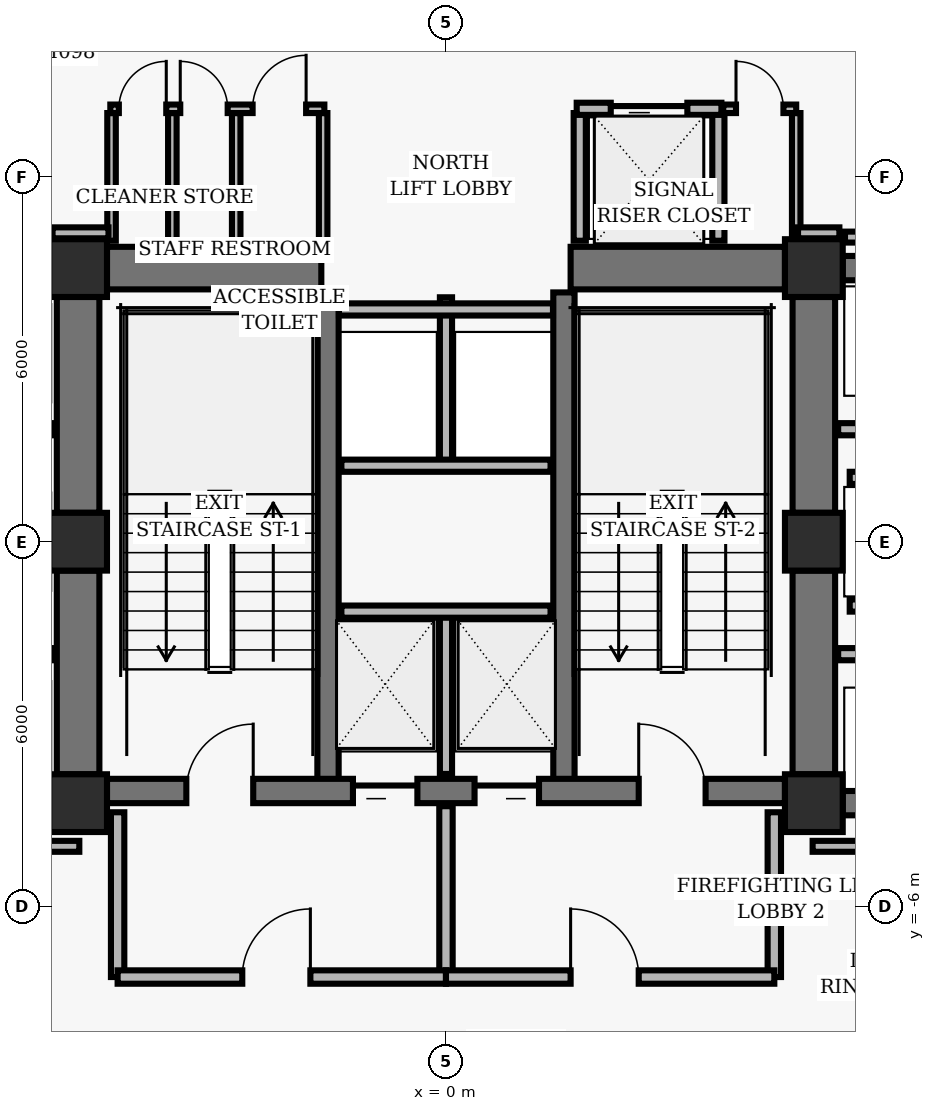
"""IFC4 building model, lengths in metres.
Left out: names, types, materials, properties, quantities, classifications, styles, units other than length and angle.
Written with IfcOpenShell. Run it as: python <this file> out.ifc"""

import sys

from ifc_helpers import new_model, si_unit, direction, frame, frame_2d, origin, origin_2d, place, context, subcontext, project, spatial, rectangle, hollow_rectangle, extrude, element, fill, save


model = new_model("IFC4")
c1 = context("Model", 3, precision=1e-05, world=origin(), true_north=direction((0.0, 1.0)))
c2 = subcontext(c1, "Body", "Model", "MODEL_VIEW")
j1 = project(units=[si_unit("LENGTHUNIT", "METRE"), si_unit("PLANEANGLEUNIT", "RADIAN")], contexts=[c1])
p1 = place(None, origin())
s1 = spatial("IfcSite", under=j1, at=p1, CompositionType="ELEMENT")
p2 = place(p1, origin())
s2 = spatial("IfcBuilding", under=s1, at=p2, CompositionType="ELEMENT")
p3 = place(p2, frame((0.0, 0.0, 69.76)))
s3 = spatial("IfcBuildingStorey", under=s2, at=p3, CompositionType="ELEMENT", Elevation=69.76)
for number, where, z_axis, x_axis in (
    (1, (-6.05, 4.5, 0.0), (0.0, 0.0, 1.0), (1.0, 0.0, 0.0)),
    (2, (6.05, 4.5, 0.0), (0.0, 0.0, 1.0), (1.0, 0.0, 0.0)),
    (3, (-6.05, 0.0, 0.0), (0.0, 0.0, 1.0), (1.0, 0.0, 0.0)),
    (4, (6.05, 0.0, 0.0), (0.0, 0.0, 1.0), (1.0, 0.0, 0.0)),
    (5, (-6.05, -4.3, 0.0), (0.0, 0.0, 1.0), (1.0, 0.0, 0.0)),
    (6, (6.05, -4.3, 0.0), (0.0, 0.0, 1.0), (1.0, 0.0, 0.0)),
):
    element("IfcColumn", number, at=place(p3, frame(where, z_axis=z_axis, x_axis=x_axis)), inside=s3, PredefinedType="COLUMN", context=c2, shape_type="SweptSolid", body=[
        extrude(hollow_rectangle(XDim=0.95, YDim=0.95, WallThickness=0.06, InnerFilletRadius=0.02, OuterFilletRadius=0.04, at=origin_2d()), origin(), (0.0, 0.0, 1.0), 3.36),
    ])
p4 = place(p3, frame((-6.05, 0.475, 0.0), z_axis=(0.0, 0.0, 1.0), x_axis=(0.0, 1.0, 0.0)))
e7 = element("IfcWall", 7, at=p4, inside=s3, PredefinedType="SHEAR", context=c2, shape_type="SweptSolid", body=[
    extrude(rectangle(XDim=3.55, YDim=0.7, at=frame_2d((1.775, 0.0))), origin(), (0.0, 0.0, 1.0), 3.098),
])
p5 = place(p3, frame((-6.05, -3.825, 0.0), z_axis=(0.0, 0.0, 1.0), x_axis=(0.0, 1.0, 0.0)))
e8 = element("IfcWall", 8, at=p5, inside=s3, PredefinedType="SHEAR", context=c2, shape_type="SweptSolid", body=[
    extrude(rectangle(XDim=3.35, YDim=0.7, at=frame_2d((1.675, 0.0))), origin(), (0.0, 0.0, 1.0), 3.098),
])
p6 = place(p3, frame((6.05, 0.475, 0.0), z_axis=(0.0, 0.0, 1.0), x_axis=(0.0, 1.0, 0.0)))
e9 = element("IfcWall", 9, at=p6, inside=s3, PredefinedType="SHEAR", context=c2, shape_type="SweptSolid", body=[
    extrude(rectangle(XDim=3.55, YDim=0.7, at=frame_2d((1.775, 0.0))), origin(), (0.0, 0.0, 1.0), 3.098),
])
p7 = place(p3, frame((6.05, -3.825, 0.0), z_axis=(0.0, 0.0, 1.0), x_axis=(0.0, 1.0, 0.0)))
e10 = element("IfcWall", 10, at=p7, inside=s3, PredefinedType="SHEAR", context=c2, shape_type="SweptSolid", body=[
    extrude(rectangle(XDim=3.35, YDim=0.7, at=frame_2d((1.675, 0.0))), origin(), (0.0, 0.0, 1.0), 3.098),
])
for number, where, z_axis, x_axis in (
    (11, (-1.94, -4.1, 0.0), (0.0, 0.0, 1.0), (0.0, 1.0, 0.0)),
    (12, (1.94, -4.1, 0.0), (0.0, 0.0, 1.0), (0.0, 1.0, 0.0)),
):
    element("IfcWall", number, at=place(p3, frame(where, z_axis=z_axis, x_axis=x_axis)), inside=s3, PredefinedType="SHEAR", context=c2, shape_type="SweptSolid", body=[
        extrude(rectangle(XDim=8.2, YDim=0.35, at=frame_2d((4.1, 0.0))), origin(), (0.0, 0.0, 1.0), 3.098),
    ])
p8 = place(p3, frame((-5.575, -4.1, 0.0), z_axis=(0.0, 0.0, 1.0), x_axis=(1.0, 0.0, 0.0)))
e13 = element("IfcWall", 13, at=p8, inside=s3, PredefinedType="SHEAR", context=c2, shape_type="SweptSolid", body=[
    extrude(rectangle(XDim=11.15, YDim=0.4, at=frame_2d((5.575, 0.0))), origin(), (0.0, 0.0, 1.0), 3.098),
])
p9 = place(p8, frame((1.305, 0.0, 0.0)))
e14 = element("IfcOpeningElement", 14, at=p9, cuts=e13, PredefinedType="OPENING", context=c2, shape_type="SweptSolid", body=[
    extrude(rectangle(XDim=1.1, YDim=2.04, at=frame_2d((0.55, 1.02))), frame((0.0, 0.21, 0.0), z_axis=(0.0, -1.0, 0.0), x_axis=(1.0, 0.0, 0.0)), (0.0, 0.0, 1.0), 0.42),
])
p10 = place(p8, frame((8.745, 0.0, 0.0)))
e15 = element("IfcOpeningElement", 15, at=p10, cuts=e13, PredefinedType="OPENING", context=c2, shape_type="SweptSolid", body=[
    extrude(rectangle(XDim=1.1, YDim=2.04, at=frame_2d((0.55, 1.02))), frame((0.0, 0.21, 0.0), z_axis=(0.0, -1.0, 0.0), x_axis=(1.0, 0.0, 0.0)), (0.0, 0.0, 1.0), 0.42),
])
p11 = place(p8, frame((4.045, 0.0, 0.0)))
e16 = element("IfcOpeningElement", 16, at=p11, cuts=e13, PredefinedType="OPENING", context=c2, shape_type="SweptSolid", body=[
    extrude(rectangle(XDim=1.06, YDim=2.04, at=frame_2d((0.53, 1.02))), frame((0.0, 0.21, 0.0), z_axis=(0.0, -1.0, 0.0), x_axis=(1.0, 0.0, 0.0)), (0.0, 0.0, 1.0), 0.42),
])
p12 = place(p8, frame((6.045, 0.0, 0.0)))
e17 = element("IfcOpeningElement", 17, at=p12, cuts=e13, PredefinedType="OPENING", context=c2, shape_type="SweptSolid", body=[
    extrude(rectangle(XDim=1.06, YDim=2.04, at=frame_2d((0.53, 1.02))), frame((0.0, 0.21, 0.0), z_axis=(0.0, -1.0, 0.0), x_axis=(1.0, 0.0, 0.0)), (0.0, 0.0, 1.0), 0.42),
])
for number, where, z_axis, x_axis in (
    (18, (-5.575, 4.5, 0.0), (0.0, 0.0, 1.0), (1.0, 0.0, 0.0)),
    (19, (2.05, 4.5, 0.0), (0.0, 0.0, 1.0), (1.0, 0.0, 0.0)),
):
    element("IfcWall", number, at=place(p3, frame(where, z_axis=z_axis, x_axis=x_axis)), inside=s3, PredefinedType="SHEAR", context=c2, shape_type="SweptSolid", body=[
        extrude(rectangle(XDim=3.525, YDim=0.7, at=frame_2d((1.762, 0.0))), origin(), (0.0, 0.0, 1.0), 3.098),
    ])
for number, where, z_axis, x_axis in (
    (20, (6.525, 4.5, 0.0), (0.0, 0.0, 1.0), (1.0, 0.0, 0.0)),
    (21, (6.525, -4.3, 0.0), (0.0, 0.0, 1.0), (1.0, 0.0, 0.0)),
):
    element("IfcWall", number, at=place(p3, frame(where, z_axis=z_axis, x_axis=x_axis)), inside=s3, PredefinedType="SHEAR", context=c2, shape_type="SweptSolid", body=[
        extrude(rectangle(XDim=1.95, YDim=0.4, at=frame_2d((0.975, 0.0))), origin(), (0.0, 0.0, 1.0), 3.098),
    ])
p13 = place(p3, frame((0.0, -3.82, 0.0), z_axis=(0.0, 0.0, 1.0), x_axis=(0.0, 1.0, 0.0)))
e22 = element("IfcWall", 22, at=p13, inside=s3, PredefinedType="PARTITIONING", context=c2, shape_type="SweptSolid", body=[
    extrude(rectangle(XDim=2.67, YDim=0.2, at=frame_2d((1.335, 0.0))), origin(), (0.0, 0.0, 1.0), 3.073),
])
p14 = place(p3, frame((-1.72, -1.15, 0.0), z_axis=(0.0, 0.0, 1.0), x_axis=(1.0, 0.0, 0.0)))
e23 = element("IfcWall", 23, at=p14, inside=s3, PredefinedType="PARTITIONING", context=c2, shape_type="SweptSolid", body=[
    extrude(rectangle(XDim=3.44, YDim=0.2, at=frame_2d((1.72, 0.0))), origin(), (0.0, 0.0, 1.0), 3.073),
])
for number, where, z_axis, x_axis in (
    (24, (-5.4, -7.16, 0.0), (0.0, 0.0, 1.0), (0.0, 1.0, 0.0)),
    (25, (5.4, -7.16, 0.0), (0.0, 0.0, 1.0), (0.0, 1.0, 0.0)),
):
    element("IfcWall", number, at=place(p3, frame(where, z_axis=z_axis, x_axis=x_axis)), inside=s3, PredefinedType="PARTITIONING", context=c2, shape_type="SweptSolid", body=[
        extrude(rectangle(XDim=2.71, YDim=0.22, at=frame_2d((1.355, 0.0))), origin(), (0.0, 0.0, 1.0), 3.073),
    ])
p15 = place(p3, frame((0.0, -7.16, 0.0), z_axis=(0.0, 0.0, 1.0), x_axis=(0.0, 1.0, 0.0)))
e26 = element("IfcWall", 26, at=p15, inside=s3, PredefinedType="PARTITIONING", context=c2, shape_type="SweptSolid", body=[
    extrude(rectangle(XDim=2.81, YDim=0.22, at=frame_2d((1.405, 0.0))), origin(), (0.0, 0.0, 1.0), 3.073),
])
p16 = place(p3, frame((-5.4, -7.16, 0.0), z_axis=(0.0, 0.0, 1.0), x_axis=(1.0, 0.0, 0.0)))
e27 = element("IfcWall", 27, at=p16, inside=s3, PredefinedType="PARTITIONING", context=c2, shape_type="SweptSolid", body=[
    extrude(rectangle(XDim=5.4, YDim=0.22, at=frame_2d((2.7, 0.0))), origin(), (0.0, 0.0, 1.0), 2.587),
])
p17 = place(p16, frame((2.05, 0.0, 0.0)))
e28 = element("IfcOpeningElement", 28, at=p17, cuts=e27, PredefinedType="OPENING", context=c2, shape_type="SweptSolid", body=[
    extrude(rectangle(XDim=1.12, YDim=2.02, at=frame_2d((0.56, 1.01))), frame((0.0, 0.12, 0.0), z_axis=(0.0, -1.0, 0.0), x_axis=(1.0, 0.0, 0.0)), (0.0, 0.0, 1.0), 0.24),
])
p18 = place(p3, frame((0.0, -7.16, 0.0), z_axis=(0.0, 0.0, 1.0), x_axis=(1.0, 0.0, 0.0)))
e29 = element("IfcWall", 29, at=p18, inside=s3, PredefinedType="PARTITIONING", context=c2, shape_type="SweptSolid", body=[
    extrude(rectangle(XDim=5.4, YDim=0.22, at=frame_2d((2.7, 0.0))), origin(), (0.0, 0.0, 1.0), 2.587),
])
p19 = place(p18, frame((2.05, 0.0, 0.0)))
e30 = element("IfcOpeningElement", 30, at=p19, cuts=e29, PredefinedType="OPENING", context=c2, shape_type="SweptSolid", body=[
    extrude(rectangle(XDim=1.12, YDim=2.02, at=frame_2d((0.56, 1.01))), frame((0.0, 0.12, 0.0), z_axis=(0.0, -1.0, 0.0), x_axis=(1.0, 0.0, 0.0)), (0.0, 0.0, 1.0), 0.24),
])
p20 = place(p3, frame((0.0, 1.25, 0.0), z_axis=(0.0, 0.0, 1.0), x_axis=(0.0, 1.0, 0.0)))
e31 = element("IfcWall", 31, at=p20, inside=s3, PredefinedType="PARTITIONING", context=c2, shape_type="SweptSolid", body=[
    extrude(rectangle(XDim=2.77, YDim=0.2, at=frame_2d((1.385, 0.0))), origin(), (0.0, 0.0, 1.0), 3.073),
])
p21 = place(p3, frame((-1.72, 1.25, 0.0), z_axis=(0.0, 0.0, 1.0), x_axis=(1.0, 0.0, 0.0)))
e32 = element("IfcWall", 32, at=p21, inside=s3, PredefinedType="PARTITIONING", context=c2, shape_type="SweptSolid", body=[
    extrude(rectangle(XDim=3.44, YDim=0.2, at=frame_2d((1.72, 0.0))), origin(), (0.0, 0.0, 1.0), 3.073),
])
p22 = place(p3, frame((-1.76, 3.82, 0.0), z_axis=(0.0, 0.0, 1.0), x_axis=(1.0, 0.0, 0.0)))
e33 = element("IfcWall", 33, at=p22, inside=s3, PredefinedType="PARTITIONING", context=c2, shape_type="SweptSolid", body=[
    extrude(rectangle(XDim=3.52, YDim=0.2, at=frame_2d((1.76, 0.0))), origin(), (0.0, 0.0, 1.0), 3.073),
])
for number, where, z_axis, x_axis in (
    (34, (2.2, 4.95, 0.0), (0.0, 0.0, 1.0), (0.0, 1.0, 0.0)),
    (35, (4.48, 4.95, 0.0), (0.0, 0.0, 1.0), (0.0, 1.0, 0.0)),
):
    element("IfcWall", number, at=place(p3, frame(where, z_axis=z_axis, x_axis=x_axis)), inside=s3, PredefinedType="PARTITIONING", context=c2, shape_type="SweptSolid", body=[
        extrude(rectangle(XDim=2.1, YDim=0.2, at=frame_2d((1.05, 0.0))), origin(), (0.0, 0.0, 1.0), 3.073),
    ])
p23 = place(p3, frame((2.15, 7.12, 0.0), z_axis=(0.0, 0.0, 1.0), x_axis=(1.0, 0.0, 0.0)))
e36 = element("IfcWall", 36, at=p23, inside=s3, PredefinedType="PARTITIONING", context=c2, shape_type="SweptSolid", body=[
    extrude(rectangle(XDim=2.38, YDim=0.2, at=frame_2d((1.19, 0.0))), origin(), (0.0, 0.0, 1.0), 2.587),
])
p24 = place(p23, frame((0.56, 0.0, 0.0)))
e37 = element("IfcOpeningElement", 37, at=p24, cuts=e36, PredefinedType="OPENING", context=c2, shape_type="SweptSolid", body=[
    extrude(rectangle(XDim=1.26, YDim=2.06, at=frame_2d((0.63, 1.03))), frame((0.0, 0.11, 0.0), z_axis=(0.0, -1.0, 0.0), x_axis=(1.0, 0.0, 0.0)), (0.0, 0.0, 1.0), 0.22),
])
for number, where, z_axis, x_axis in (
    (38, (-5.5, 4.95, 0.0), (0.0, 0.0, 1.0), (0.0, 1.0, 0.0)),
    (39, (-4.5, 4.95, 0.0), (0.0, 0.0, 1.0), (0.0, 1.0, 0.0)),
    (40, (-3.45, 4.95, 0.0), (0.0, 0.0, 1.0), (0.0, 1.0, 0.0)),
    (41, (-2.02, 4.95, 0.0), (0.0, 0.0, 1.0), (0.0, 1.0, 0.0)),
):
    element("IfcWall", number, at=place(p3, frame(where, z_axis=z_axis, x_axis=x_axis)), inside=s3, PredefinedType="PARTITIONING", context=c2, shape_type="SweptSolid", body=[
        extrude(rectangle(XDim=2.1, YDim=0.14, at=frame_2d((1.05, 0.0))), origin(), (0.0, 0.0, 1.0), 3.073),
    ])
p25 = place(p3, frame((-5.52, 7.12, 0.0), z_axis=(0.0, 0.0, 1.0), x_axis=(1.0, 0.0, 0.0)))
e42 = element("IfcWall", 42, at=p25, inside=s3, PredefinedType="PARTITIONING", context=c2, shape_type="SweptSolid", body=[
    extrude(rectangle(XDim=3.52, YDim=0.14, at=frame_2d((1.76, 0.0))), origin(), (0.0, 0.0, 1.0), 3.073),
])
p26 = place(p25, frame((0.14, 0.0, 0.0)))
e43 = element("IfcOpeningElement", 43, at=p26, cuts=e42, PredefinedType="OPENING", context=c2, shape_type="SweptSolid", body=[
    extrude(rectangle(XDim=0.78, YDim=2.01, at=frame_2d((0.39, 1.005))), frame((0.0, 0.08, 0.0), z_axis=(0.0, -1.0, 0.0), x_axis=(1.0, 0.0, 0.0)), (0.0, 0.0, 1.0), 0.16),
])
p27 = place(p25, frame((1.15, 0.0, 0.0)))
e44 = element("IfcOpeningElement", 44, at=p27, cuts=e42, PredefinedType="OPENING", context=c2, shape_type="SweptSolid", body=[
    extrude(rectangle(XDim=0.78, YDim=2.01, at=frame_2d((0.39, 1.005))), frame((0.0, 0.08, 0.0), z_axis=(0.0, -1.0, 0.0), x_axis=(1.0, 0.0, 0.0)), (0.0, 0.0, 1.0), 0.16),
])
p28 = place(p25, frame((2.34, 0.0, 0.0)))
e45 = element("IfcOpeningElement", 45, at=p28, cuts=e42, PredefinedType="OPENING", context=c2, shape_type="SweptSolid", body=[
    extrude(rectangle(XDim=0.88, YDim=2.02, at=frame_2d((0.44, 1.01))), frame((0.0, 0.08, 0.0), z_axis=(0.0, -1.0, 0.0), x_axis=(1.0, 0.0, 0.0)), (0.0, 0.0, 1.0), 0.16),
])
p29 = place(p3, frame((5.76, 4.95, 0.0), z_axis=(0.0, 0.0, 1.0), x_axis=(0.0, 1.0, 0.0)))
e46 = element("IfcWall", 46, at=p29, inside=s3, PredefinedType="PARTITIONING", context=c2, shape_type="SweptSolid", body=[
    extrude(rectangle(XDim=2.1, YDim=0.14, at=frame_2d((1.05, 0.0))), origin(), (0.0, 0.0, 1.0), 3.073),
])
p30 = place(p3, frame((4.56, 7.12, 0.0), z_axis=(0.0, 0.0, 1.0), x_axis=(1.0, 0.0, 0.0)))
e47 = element("IfcWall", 47, at=p30, inside=s3, PredefinedType="PARTITIONING", context=c2, shape_type="SweptSolid", body=[
    extrude(rectangle(XDim=1.2, YDim=0.14, at=frame_2d((0.6, 0.0))), origin(), (0.0, 0.0, 1.0), 2.587),
])
p31 = place(p30, frame((0.21, 0.0, 0.0)))
e48 = element("IfcOpeningElement", 48, at=p31, cuts=e47, PredefinedType="OPENING", context=c2, shape_type="SweptSolid", body=[
    extrude(rectangle(XDim=0.78, YDim=2.01, at=frame_2d((0.39, 1.005))), frame((0.0, 0.08, 0.0), z_axis=(0.0, -1.0, 0.0), x_axis=(1.0, 0.0, 0.0)), (0.0, 0.0, 1.0), 0.16),
])
for number, where, z_axis, x_axis in (
    (49, (-8.55, -1.85, 0.0), (0.0, 0.0, 1.0), (1.0, 0.0, 0.0)),
    (50, (-8.55, 1.85, 0.0), (0.0, 0.0, 1.0), (1.0, 0.0, 0.0)),
    (51, (6.45, -1.85, 0.0), (0.0, 0.0, 1.0), (1.0, 0.0, 0.0)),
    (52, (6.45, 1.85, 0.0), (0.0, 0.0, 1.0), (1.0, 0.0, 0.0)),
):
    element("IfcWall", number, at=place(p3, frame(where, z_axis=z_axis, x_axis=x_axis)), inside=s3, PredefinedType="PARTITIONING", context=c2, shape_type="SweptSolid", body=[
        extrude(rectangle(XDim=2.1, YDim=0.2, at=frame_2d((1.05, 0.0))), origin(), (0.0, 0.0, 1.0), 3.073),
    ])
for number, where, z_axis, x_axis in (
    (53, (6.64, -1.05, 0.0), (0.0, 0.0, 1.0), (1.0, 0.0, 0.0)),
    (54, (6.64, 1.05, 0.0), (0.0, 0.0, 1.0), (1.0, 0.0, 0.0)),
):
    element("IfcWall", number, at=place(p3, frame(where, z_axis=z_axis, x_axis=x_axis)), inside=s3, PredefinedType="PARTITIONING", context=c2, shape_type="SweptSolid", body=[
        extrude(rectangle(XDim=1.91, YDim=0.2, at=frame_2d((0.955, 0.0))), origin(), (0.0, 0.0, 1.0), 3.073),
    ])
for number, where, z_axis, x_axis in (
    (55, (-9.37, -5.01, 0.0), (0.0, 0.0, 1.0), (1.0, 0.0, 0.0)),
    (56, (6.03, -5.01, 0.0), (0.0, 0.0, 1.0), (1.0, 0.0, 0.0)),
):
    element("IfcWall", number, at=place(p3, frame(where, z_axis=z_axis, x_axis=x_axis)), inside=s3, PredefinedType="PARTITIONING", context=c2, shape_type="SweptSolid", body=[
        extrude(rectangle(XDim=3.34, YDim=0.18, at=frame_2d((1.67, 0.0))), origin(), (0.0, 0.0, 1.0), 3.073),
    ])
p32 = place(p3, frame((9.37, 5.01, 0.0), z_axis=(0.0, 0.0, 1.0), x_axis=(-1.0, 0.0, 0.0)))
e57 = element("IfcWall", 57, at=p32, inside=s3, PredefinedType="PARTITIONING", context=c2, shape_type="SweptSolid", body=[
    extrude(rectangle(XDim=2.808, YDim=0.18, at=frame_2d((1.404, 0.0))), origin(), (0.0, 0.0, 1.0), 3.073),
])
p33 = place(p3, frame((6.47, 5.08, 0.0), z_axis=(0.0, 0.0, 1.0), x_axis=(-1.0, 0.0, 0.0)))
e58 = element("IfcWall", 58, at=p33, inside=s3, PredefinedType="PARTITIONING", context=c2, shape_type="SweptSolid", body=[
    extrude(rectangle(XDim=0.68, YDim=0.18, at=frame_2d((0.34, 0.0))), origin(), (0.0, 0.0, 1.0), 3.073),
])
p34 = place(p3, frame((-5.55, 5.08, 0.0), z_axis=(0.0, 0.0, 1.0), x_axis=(-1.0, 0.0, 0.0)))
e59 = element("IfcWall", 59, at=p34, inside=s3, PredefinedType="PARTITIONING", context=c2, shape_type="SweptSolid", body=[
    extrude(rectangle(XDim=0.92, YDim=0.18, at=frame_2d((0.46, 0.0))), origin(), (0.0, 0.0, 1.0), 3.073),
])
p35 = place(p9, origin())
e60 = element("IfcDoor", 60, at=p35, inside=s3, OperationType="SINGLE_SWING_RIGHT", PredefinedType="DOOR", context=c2, shape_type="SweptSolid", body=[
    extrude(rectangle(XDim=1.1, YDim=2.04, at=frame_2d((0.55, 1.02))), frame((0.0, 0.025, 0.0), z_axis=(0.0, -1.0, 0.0), x_axis=(1.0, 0.0, 0.0)), (0.0, 0.0, 1.0), 0.05),
])
fill(e14, e60)
p36 = place(p10, origin())
e61 = element("IfcDoor", 61, at=p36, inside=s3, OperationType="SINGLE_SWING_LEFT", PredefinedType="DOOR", context=c2, shape_type="SweptSolid", body=[
    extrude(rectangle(XDim=1.1, YDim=2.04, at=frame_2d((0.55, 1.02))), frame((0.0, 0.025, 0.0), z_axis=(0.0, -1.0, 0.0), x_axis=(1.0, 0.0, 0.0)), (0.0, 0.0, 1.0), 0.05),
])
fill(e15, e61)
p37 = place(p11, origin())
e62 = element("IfcDoor", 62, at=p37, inside=s3, OperationType="SLIDING_TO_LEFT", PredefinedType="DOOR", context=c2, shape_type="SweptSolid", body=[
    extrude(rectangle(XDim=1.06, YDim=2.04, at=frame_2d((0.53, 1.02))), frame((0.0, 0.025, 0.0), z_axis=(0.0, -1.0, 0.0), x_axis=(1.0, 0.0, 0.0)), (0.0, 0.0, 1.0), 0.05),
])
fill(e16, e62)
p38 = place(p12, origin())
e63 = element("IfcDoor", 63, at=p38, inside=s3, OperationType="SLIDING_TO_RIGHT", PredefinedType="DOOR", context=c2, shape_type="SweptSolid", body=[
    extrude(rectangle(XDim=1.06, YDim=2.04, at=frame_2d((0.53, 1.02))), frame((0.0, 0.025, 0.0), z_axis=(0.0, -1.0, 0.0), x_axis=(1.0, 0.0, 0.0)), (0.0, 0.0, 1.0), 0.05),
])
fill(e17, e63)
p39 = place(p17, origin())
e64 = element("IfcDoor", 64, at=p39, inside=s3, OperationType="SINGLE_SWING_RIGHT", PredefinedType="DOOR", context=c2, shape_type="SweptSolid", body=[
    extrude(rectangle(XDim=1.12, YDim=2.02, at=frame_2d((0.56, 1.01))), frame((0.0, 0.025, 0.0), z_axis=(0.0, -1.0, 0.0), x_axis=(1.0, 0.0, 0.0)), (0.0, 0.0, 1.0), 0.05),
])
fill(e28, e64)
p40 = place(p19, origin())
e65 = element("IfcDoor", 65, at=p40, inside=s3, OperationType="SINGLE_SWING_LEFT", PredefinedType="DOOR", context=c2, shape_type="SweptSolid", body=[
    extrude(rectangle(XDim=1.12, YDim=2.02, at=frame_2d((0.56, 1.01))), frame((0.0, 0.025, 0.0), z_axis=(0.0, -1.0, 0.0), x_axis=(1.0, 0.0, 0.0)), (0.0, 0.0, 1.0), 0.05),
])
fill(e30, e65)
p41 = place(p24, origin())
e66 = element("IfcDoor", 66, at=p41, inside=s3, OperationType="SLIDING_TO_LEFT", PredefinedType="DOOR", context=c2, shape_type="SweptSolid", body=[
    extrude(rectangle(XDim=1.26, YDim=2.06, at=frame_2d((0.63, 1.03))), frame((0.0, 0.025, 0.0), z_axis=(0.0, -1.0, 0.0), x_axis=(1.0, 0.0, 0.0)), (0.0, 0.0, 1.0), 0.05),
])
fill(e37, e66)
p42 = place(p26, origin())
e67 = element("IfcDoor", 67, at=p42, inside=s3, OperationType="SINGLE_SWING_RIGHT", PredefinedType="DOOR", context=c2, shape_type="SweptSolid", body=[
    extrude(rectangle(XDim=0.78, YDim=2.01, at=frame_2d((0.39, 1.005))), frame((0.0, 0.025, 0.0), z_axis=(0.0, -1.0, 0.0), x_axis=(1.0, 0.0, 0.0)), (0.0, 0.0, 1.0), 0.05),
])
fill(e43, e67)
p43 = place(p27, origin())
e68 = element("IfcDoor", 68, at=p43, inside=s3, OperationType="SINGLE_SWING_LEFT", PredefinedType="DOOR", context=c2, shape_type="SweptSolid", body=[
    extrude(rectangle(XDim=0.78, YDim=2.01, at=frame_2d((0.39, 1.005))), frame((0.0, 0.025, 0.0), z_axis=(0.0, -1.0, 0.0), x_axis=(1.0, 0.0, 0.0)), (0.0, 0.0, 1.0), 0.05),
])
fill(e44, e68)
p44 = place(p28, origin())
e69 = element("IfcDoor", 69, at=p44, inside=s3, OperationType="SINGLE_SWING_RIGHT", PredefinedType="DOOR", context=c2, shape_type="SweptSolid", body=[
    extrude(rectangle(XDim=0.88, YDim=2.02, at=frame_2d((0.44, 1.01))), frame((0.0, 0.025, 0.0), z_axis=(0.0, -1.0, 0.0), x_axis=(1.0, 0.0, 0.0)), (0.0, 0.0, 1.0), 0.05),
])
fill(e45, e69)
p45 = place(p31, origin())
e70 = element("IfcDoor", 70, at=p45, inside=s3, OperationType="SINGLE_SWING_LEFT", PredefinedType="DOOR", context=c2, shape_type="SweptSolid", body=[
    extrude(rectangle(XDim=0.78, YDim=2.01, at=frame_2d((0.39, 1.005))), frame((0.0, 0.025, 0.0), z_axis=(0.0, -1.0, 0.0), x_axis=(1.0, 0.0, 0.0)), (0.0, 0.0, 1.0), 0.05),
])
fill(e48, e70)
save(model, sys.argv[1])
